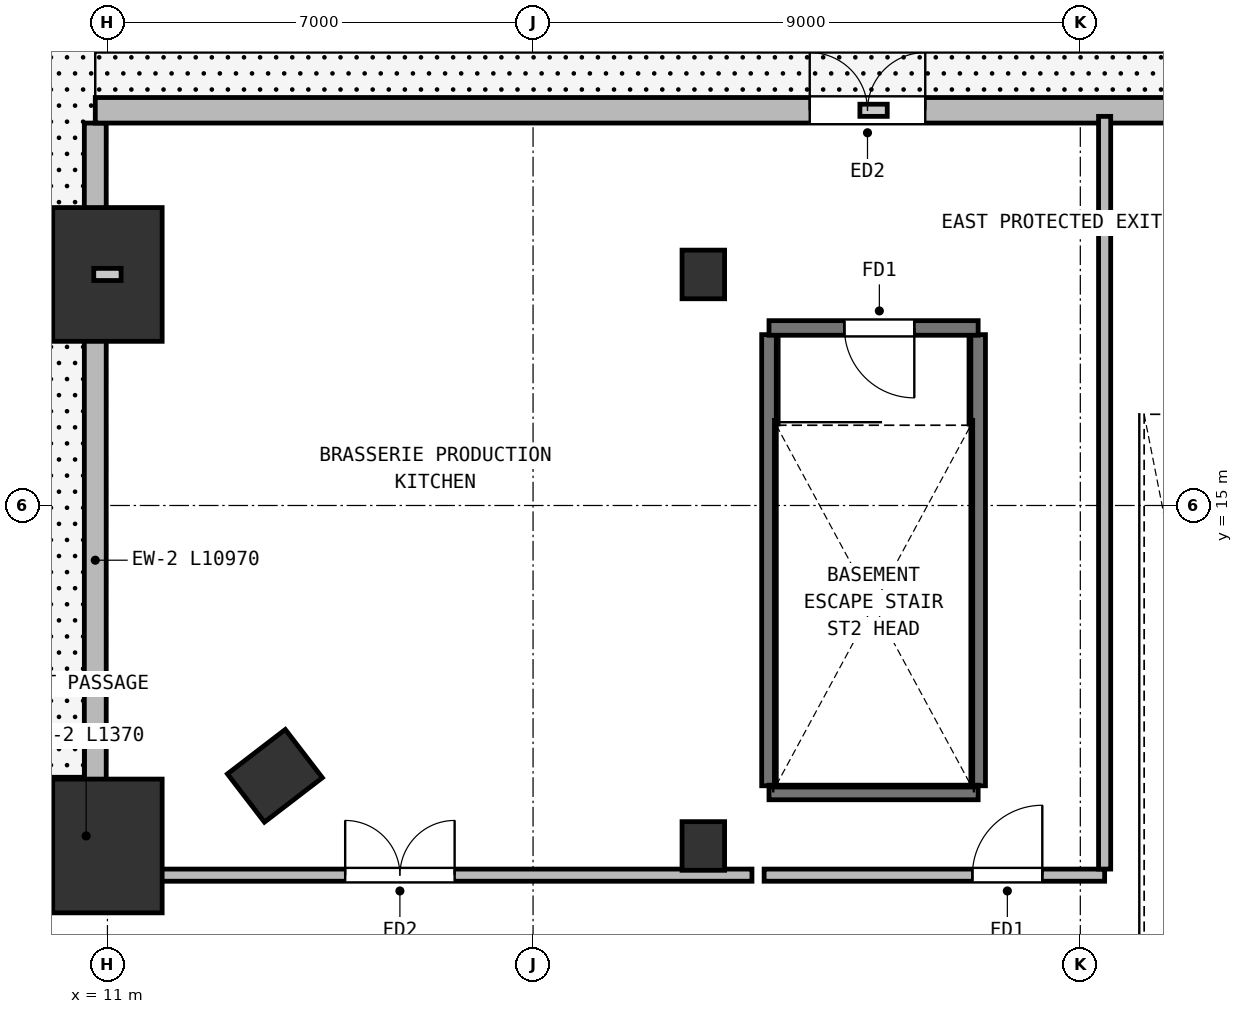
"""IFC4 building model, lengths in metres.
Left out: names, types, materials, properties, quantities, classifications, styles, units other than length and angle.
Written with IfcOpenShell. Run it as: python <this file> out.ifc"""

import sys

from ifc_helpers import new_model, si_unit, direction, frame, frame_2d, origin, origin_2d, place, context, subcontext, project, spatial, rectangle, extrude, element, fill, save


model = new_model("IFC4")
c1 = context("Model", 3, precision=1e-05, world=origin(), true_north=direction((0.0, 1.0)))
c2 = subcontext(c1, "Body", "Model", "MODEL_VIEW")
j1 = project(units=[si_unit("LENGTHUNIT", "METRE"), si_unit("PLANEANGLEUNIT", "RADIAN")], contexts=[c1])
p1 = place(None, origin())
s1 = spatial("IfcSite", under=j1, at=p1, CompositionType="ELEMENT")
p2 = place(p1, origin())
s2 = spatial("IfcBuilding", under=s1, at=p2, CompositionType="ELEMENT")
p3 = place(p2, origin())
s3 = spatial("IfcBuildingStorey", under=s2, at=p3, CompositionType="ELEMENT", Elevation=0.0)
p4 = place(p3, frame((13.754, 10.554, 0.0), z_axis=(0.0, 0.0, 1.0), x_axis=(-0.608761429009, 0.793353340291, 0.0)))
e1 = element("IfcColumn", 1, at=p4, inside=s3, PredefinedType="COLUMN", context=c2, shape_type="SweptSolid", body=[
    extrude(rectangle(XDim=1.0, YDim=1.2, at=origin_2d()), origin(), (0.0, 0.0, 1.0), 6.0),
])
for number, where, z_axis, x_axis in (
    (2, (11.0, 9.4, 0.0), (0.0, 0.0, 1.0), (1.0, 0.0, 0.0)),
    (3, (11.0, 18.8, 0.0), (0.0, 0.0, 1.0), (1.0, 0.0, 0.0)),
):
    element("IfcColumn", number, at=place(p3, frame(where, z_axis=z_axis, x_axis=x_axis)), inside=s3, PredefinedType="COLUMN", context=c2, shape_type="SweptSolid", body=[
        extrude(rectangle(XDim=1.8, YDim=2.2, at=origin_2d()), origin(), (0.0, 0.0, 1.0), 6.0),
    ])
for number, where, z_axis, x_axis in (
    (4, (20.8, 9.4, 0.0), (0.0, 0.0, 1.0), (1.0, 0.0, 0.0)),
    (5, (20.8, 18.8, 0.0), (0.0, 0.0, 1.0), (1.0, 0.0, 0.0)),
):
    element("IfcColumn", number, at=place(p3, frame(where, z_axis=z_axis, x_axis=x_axis)), inside=s3, PredefinedType="COLUMN", context=c2, shape_type="SweptSolid", body=[
        extrude(rectangle(XDim=0.7, YDim=0.8, at=origin_2d()), origin(), (0.0, 0.0, 1.0), 6.0),
    ])
p5 = place(p3, frame((5.7, 10.32, 0.0), z_axis=(0.0, 0.0, 1.0), x_axis=(1.0, 0.0, 0.0)))
e6 = element("IfcWall", 6, at=p5, inside=s3, PredefinedType="SOLIDWALL", context=c2, shape_type="SweptSolid", body=[
    extrude(rectangle(XDim=4.9, YDim=0.42, at=frame_2d((2.45, 0.0))), origin(), (0.0, 0.0, 1.0), 5.72),
])
p6 = place(p5, frame((1.5, 0.0, 0.0)))
e7 = element("IfcOpeningElement", 7, at=p6, cuts=e6, PredefinedType="OPENING", context=c2, shape_type="SweptSolid", body=[
    extrude(rectangle(XDim=1.9, YDim=2.35, at=frame_2d((0.95, 1.175))), frame((0.0, 0.22, 0.0), z_axis=(0.0, -1.0, 0.0), x_axis=(1.0, 0.0, 0.0)), (0.0, 0.0, 1.0), 0.44),
])
p7 = place(p3, frame((10.8, 21.29, 0.0), z_axis=(0.0, 0.0, 1.0), x_axis=(0.0, -1.0, 0.0)))
e8 = element("IfcWall", 8, at=p7, inside=s3, PredefinedType="SOLIDWALL", context=c2, shape_type="SweptSolid", body=[
    extrude(rectangle(XDim=10.97, YDim=0.36, at=frame_2d((5.485, 0.0))), origin(), (0.0, 0.0, 1.0), 5.1),
])
p8 = place(p3, frame((10.8, 21.5, 0.0), z_axis=(0.0, 0.0, 1.0), x_axis=(1.0, 0.0, 0.0)))
e9 = element("IfcWall", 9, at=p8, inside=s3, PredefinedType="SOLIDWALL", context=c2, shape_type="SweptSolid", body=[
    extrude(rectangle(XDim=25.6, YDim=0.42, at=frame_2d((12.8, 0.0))), origin(), (0.0, 0.0, 1.0), 5.72),
])
p9 = place(p8, frame((11.75, 0.0, 0.0)))
e10 = element("IfcOpeningElement", 10, at=p9, cuts=e9, PredefinedType="OPENING", context=c2, shape_type="SweptSolid", body=[
    extrude(rectangle(XDim=1.9, YDim=2.35, at=frame_2d((0.95, 1.175))), frame((0.0, 0.22, 0.0), z_axis=(0.0, -1.0, 0.0), x_axis=(1.0, 0.0, 0.0)), (0.0, 0.0, 1.0), 0.44),
])
for number, where, z_axis, x_axis in (
    (11, (21.88, 10.39, 0.0), (0.0, 0.0, 1.0), (0.0, 1.0, 0.0)),
    (12, (25.32, 10.39, 0.0), (0.0, 0.0, 1.0), (0.0, 1.0, 0.0)),
):
    element("IfcWall", number, at=place(p3, frame(where, z_axis=z_axis, x_axis=x_axis)), inside=s3, PredefinedType="SHEAR", context=c2, shape_type="SweptSolid", body=[
        extrude(rectangle(XDim=7.42, YDim=0.24, at=frame_2d((3.71, 0.0))), origin(), (0.0, 0.0, 1.0), 5.72),
    ])
p10 = place(p3, frame((21.88, 10.28, 0.0), z_axis=(0.0, 0.0, 1.0), x_axis=(1.0, 0.0, 0.0)))
e13 = element("IfcWall", 13, at=p10, inside=s3, PredefinedType="SHEAR", context=c2, shape_type="SweptSolid", body=[
    extrude(rectangle(XDim=3.44, YDim=0.24, at=frame_2d((1.72, 0.0))), origin(), (0.0, 0.0, 1.0), 5.72),
])
p11 = place(p3, frame((25.32, 17.92, 0.0), z_axis=(0.0, 0.0, 1.0), x_axis=(-1.0, 0.0, 0.0)))
e14 = element("IfcWall", 14, at=p11, inside=s3, PredefinedType="SHEAR", context=c2, shape_type="SweptSolid", body=[
    extrude(rectangle(XDim=3.44, YDim=0.24, at=frame_2d((1.72, 0.0))), origin(), (0.0, 0.0, 1.0), 5.72),
])
p12 = place(p11, frame((1.05, 0.0, 0.0)))
e15 = element("IfcOpeningElement", 15, at=p12, cuts=e14, PredefinedType="OPENING", context=c2, shape_type="SweptSolid", body=[
    extrude(rectangle(XDim=1.15, YDim=2.15, at=frame_2d((0.575, 1.075))), frame((0.0, 0.13, 0.0), z_axis=(0.0, -1.0, 0.0), x_axis=(1.0, 0.0, 0.0)), (0.0, 0.0, 1.0), 0.26),
])
p13 = place(p3, frame((11.05, 8.92, 0.0), z_axis=(0.0, 0.0, 1.0), x_axis=(1.0, 0.0, 0.0)))
e16 = element("IfcWall", 16, at=p13, inside=s3, PredefinedType="PARTITIONING", context=c2, shape_type="SweptSolid", body=[
    extrude(rectangle(XDim=10.55, YDim=0.2, at=frame_2d((5.275, 0.0))), origin(), (0.0, 0.0, 1.0), 5.72),
])
p14 = place(p13, frame((3.86, 0.0, 0.0)))
e17 = element("IfcOpeningElement", 17, at=p14, cuts=e16, PredefinedType="OPENING", context=c2, shape_type="SweptSolid", body=[
    extrude(rectangle(XDim=1.8, YDim=2.2, at=frame_2d((0.9, 1.1))), frame((0.0, 0.11, 0.0), z_axis=(0.0, -1.0, 0.0), x_axis=(1.0, 0.0, 0.0)), (0.0, 0.0, 1.0), 0.22),
])
p15 = place(p3, frame((21.8, 8.92, 0.0), z_axis=(0.0, 0.0, 1.0), x_axis=(1.0, 0.0, 0.0)))
e18 = element("IfcWall", 18, at=p15, inside=s3, PredefinedType="PARTITIONING", context=c2, shape_type="SweptSolid", body=[
    extrude(rectangle(XDim=5.6, YDim=0.2, at=frame_2d((2.8, 0.0))), origin(), (0.0, 0.0, 1.0), 5.72),
])
p16 = place(p15, frame((3.425, 0.0, 0.0)))
e19 = element("IfcOpeningElement", 19, at=p16, cuts=e18, PredefinedType="OPENING", context=c2, shape_type="SweptSolid", body=[
    extrude(rectangle(XDim=1.15, YDim=2.15, at=frame_2d((0.575, 1.075))), frame((0.0, 0.11, 0.0), z_axis=(0.0, -1.0, 0.0), x_axis=(1.0, 0.0, 0.0)), (0.0, 0.0, 1.0), 0.22),
])
p17 = place(p3, frame((27.4, 9.02, 0.0), z_axis=(0.0, 0.0, 1.0), x_axis=(0.0, 1.0, 0.0)))
e20 = element("IfcWall", 20, at=p17, inside=s3, PredefinedType="PARTITIONING", context=c2, shape_type="SweptSolid", body=[
    extrude(rectangle(XDim=12.38, YDim=0.2, at=frame_2d((6.19, 0.0))), origin(), (0.0, 0.0, 1.0), 5.72),
])
p18 = place(p3, frame((10.65, 8.88, 0.0), z_axis=(0.0, 0.0, 1.0), x_axis=(0.0, 1.0, 0.0)))
e21 = element("IfcWall", 21, at=p18, inside=s3, PredefinedType="PARTITIONING", context=c2, shape_type="SweptSolid", body=[
    extrude(rectangle(XDim=1.37, YDim=0.2, at=frame_2d((0.685, 0.0))), origin(), (0.0, 0.0, 1.0), 5.72),
])
p19 = place(p9, origin())
e22 = element("IfcDoor", 22, at=p19, inside=s3, OperationType="DOUBLE_DOOR_SINGLE_SWING", PredefinedType="DOOR", context=c2, shape_type="SweptSolid", body=[
    extrude(rectangle(XDim=1.9, YDim=2.35, at=frame_2d((0.95, 1.175))), frame((0.0, 0.025, 0.0), z_axis=(0.0, -1.0, 0.0), x_axis=(1.0, 0.0, 0.0)), (0.0, 0.0, 1.0), 0.05),
])
fill(e10, e22)
p20 = place(p12, origin())
e23 = element("IfcDoor", 23, at=p20, inside=s3, OperationType="SINGLE_SWING_LEFT", PredefinedType="DOOR", context=c2, shape_type="SweptSolid", body=[
    extrude(rectangle(XDim=1.15, YDim=2.15, at=frame_2d((0.575, 1.075))), frame((0.0, 0.025, 0.0), z_axis=(0.0, -1.0, 0.0), x_axis=(1.0, 0.0, 0.0)), (0.0, 0.0, 1.0), 0.05),
])
fill(e15, e23)
p21 = place(p14, origin())
e24 = element("IfcDoor", 24, at=p21, inside=s3, OperationType="DOUBLE_DOOR_SINGLE_SWING", PredefinedType="DOOR", context=c2, shape_type="SweptSolid", body=[
    extrude(rectangle(XDim=1.8, YDim=2.2, at=frame_2d((0.9, 1.1))), frame((0.0, 0.025, 0.0), z_axis=(0.0, -1.0, 0.0), x_axis=(1.0, 0.0, 0.0)), (0.0, 0.0, 1.0), 0.05),
])
fill(e17, e24)
p22 = place(p16, origin())
e25 = element("IfcDoor", 25, at=p22, inside=s3, OperationType="SINGLE_SWING_RIGHT", PredefinedType="DOOR", context=c2, shape_type="SweptSolid", body=[
    extrude(rectangle(XDim=1.15, YDim=2.15, at=frame_2d((0.575, 1.075))), frame((0.0, 0.025, 0.0), z_axis=(0.0, -1.0, 0.0), x_axis=(1.0, 0.0, 0.0)), (0.0, 0.0, 1.0), 0.05),
])
fill(e19, e25)
save(model, sys.argv[1])
